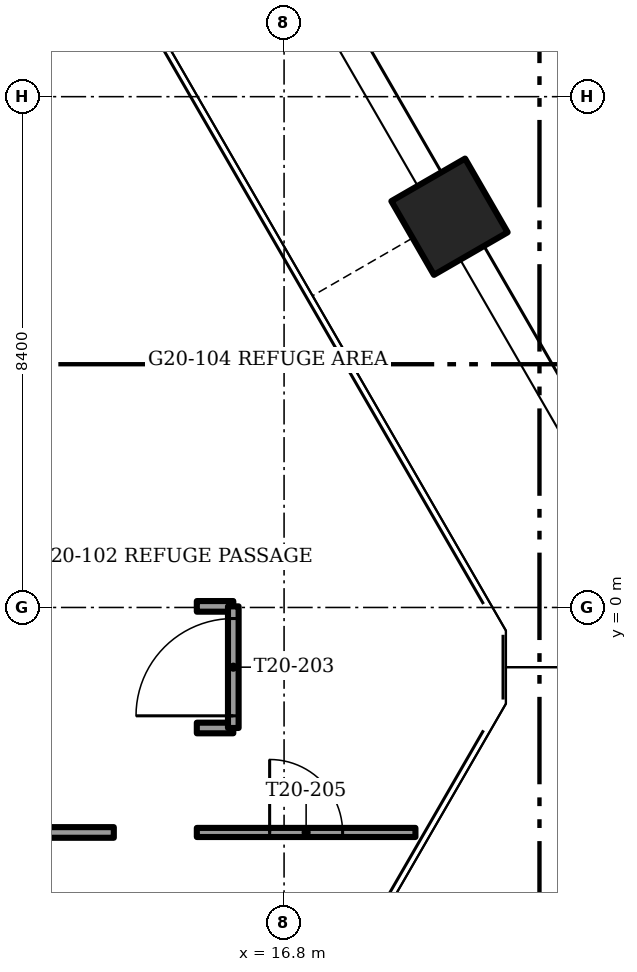
"""IFC4 building model, lengths in metres.
Left out: names, types, materials, properties, quantities, classifications, styles, units other than length and angle.
Written with IfcOpenShell. Run it as: python <this file> out.ifc"""

import sys

from ifc_helpers import new_model, si_unit, direction, frame, frame_2d, origin, origin_2d, place, context, subcontext, project, spatial, rectangle, extrude, element, fill, save


model = new_model("IFC4")
c1 = context("Model", 3, precision=1e-05, world=origin(), true_north=direction((0.0, 1.0)))
c2 = subcontext(c1, "Body", "Model", "MODEL_VIEW")
j1 = project(units=[si_unit("LENGTHUNIT", "METRE"), si_unit("PLANEANGLEUNIT", "RADIAN")], contexts=[c1])
p1 = place(None, origin())
s1 = spatial("IfcSite", under=j1, at=p1, CompositionType="ELEMENT")
p2 = place(p1, origin())
s2 = spatial("IfcBuilding", under=s1, at=p2, CompositionType="ELEMENT")
p3 = place(p2, frame((0.0, 0.0, 80.5)))
s3 = spatial("IfcBuildingStorey", under=s2, at=p3, CompositionType="ELEMENT", Elevation=80.5)
p4 = place(p3, frame((19.521, 6.426, -1.2), z_axis=(0.0, 0.0, 1.0), x_axis=(0.5, -0.866025403784, 0.0)))
e1 = element("IfcColumn", 1, at=p4, inside=s3, PredefinedType="COLUMN", context=c2, shape_type="SweptSolid", body=[
    extrude(rectangle(XDim=1.4, YDim=1.4, at=origin_2d()), origin(), (0.0, 0.0, 1.0), 5.0),
])
p5 = place(p3, frame((9.38, -3.7, 0.0), z_axis=(0.0, 0.0, 1.0), x_axis=(1.0, 0.0, 0.0)))
e2 = element("IfcWall", 2, at=p5, inside=s3, PredefinedType="PARTITIONING", context=c2, shape_type="SweptSolid", body=[
    extrude(rectangle(XDim=4.62, YDim=0.175, at=frame_2d((2.31, 0.0))), origin(), (0.0, 0.0, 1.0), 4.7),
])
p6 = place(p5, frame((1.71, 0.0, 0.0)))
e3 = element("IfcOpeningElement", 3, at=p6, cuts=e2, PredefinedType="OPENING", context=c2, shape_type="SweptSolid", body=[
    extrude(rectangle(XDim=1.2, YDim=2.1, at=frame_2d((0.6, 1.05))), frame((0.0, 0.087, 0.0), z_axis=(0.0, -1.0, 0.0), x_axis=(1.0, 0.0, 0.0)), (0.0, 0.0, 1.0), 0.175),
])
for number, where, z_axis, x_axis in (
    (4, (15.365, -1.982, 0.0), (0.0, 0.0, 1.0), (1.0, 0.0, 0.0)),
    (5, (15.365, 0.018, 0.0), (0.0, 0.0, 1.0), (1.0, 0.0, 0.0)),
):
    element("IfcWall", number, at=place(p3, frame(where, z_axis=z_axis, x_axis=x_axis)), inside=s3, PredefinedType="PARTITIONING", context=c2, shape_type="SweptSolid", body=[
        extrude(rectangle(XDim=0.6, YDim=0.175, at=frame_2d((0.3, 0.0))), origin(), (0.0, 0.0, 1.0), 4.7),
    ])
p7 = place(p3, frame((15.965, -1.982, 0.0), z_axis=(0.0, 0.0, 1.0), x_axis=(0.0, 1.0, 0.0)))
e6 = element("IfcWall", 6, at=p7, inside=s3, PredefinedType="PARTITIONING", context=c2, shape_type="SweptSolid", body=[
    extrude(rectangle(XDim=2.0, YDim=0.175, at=frame_2d((1.0, 0.0))), origin(), (0.0, 0.0, 1.0), 4.7),
])
p8 = place(p7, frame((0.2, 0.0, 0.0)))
e7 = element("IfcOpeningElement", 7, at=p8, cuts=e6, PredefinedType="OPENING", context=c2, shape_type="SweptSolid", body=[
    extrude(rectangle(XDim=1.6, YDim=2.1, at=frame_2d((0.8, 1.05))), frame((0.0, 0.087, 0.0), z_axis=(0.0, -1.0, 0.0), x_axis=(1.0, 0.0, 0.0)), (0.0, 0.0, 1.0), 0.175),
])
p9 = place(p3, frame((15.365, -3.7, 0.0), z_axis=(0.0, 0.0, 1.0), x_axis=(1.0, 0.0, 0.0)))
e8 = element("IfcWall", 8, at=p9, inside=s3, PredefinedType="PARTITIONING", context=c2, shape_type="SweptSolid", body=[
    extrude(rectangle(XDim=3.595, YDim=0.15, at=frame_2d((1.798, 0.0))), origin(), (0.0, 0.0, 1.0), 4.7),
])
p10 = place(p9, frame((1.198, 0.0, 0.0)))
e9 = element("IfcOpeningElement", 9, at=p10, cuts=e8, PredefinedType="OPENING", context=c2, shape_type="SweptSolid", body=[
    extrude(rectangle(XDim=1.2, YDim=2.1, at=frame_2d((0.6, 1.05))), frame((0.0, 0.075, 0.0), z_axis=(0.0, -1.0, 0.0), x_axis=(1.0, 0.0, 0.0)), (0.0, 0.0, 1.0), 0.15),
])
p11 = place(p8, origin())
e10 = element("IfcDoor", 10, at=p11, inside=s3, OperationType="DOUBLE_DOOR_SINGLE_SWING", PredefinedType="DOOR", context=c2, shape_type="SweptSolid", body=[
    extrude(rectangle(XDim=1.6, YDim=2.1, at=frame_2d((0.8, 1.05))), frame((0.0, 0.025, 0.0), z_axis=(0.0, -1.0, 0.0), x_axis=(1.0, 0.0, 0.0)), (0.0, 0.0, 1.0), 0.05),
])
fill(e7, e10)
p12 = place(p10, origin())
e11 = element("IfcDoor", 11, at=p12, inside=s3, OperationType="SINGLE_SWING_LEFT", PredefinedType="DOOR", context=c2, shape_type="SweptSolid", body=[
    extrude(rectangle(XDim=1.2, YDim=2.1, at=frame_2d((0.6, 1.05))), frame((0.0, 0.025, 0.0), z_axis=(0.0, -1.0, 0.0), x_axis=(1.0, 0.0, 0.0)), (0.0, 0.0, 1.0), 0.05),
])
fill(e9, e11)
save(model, sys.argv[1])
